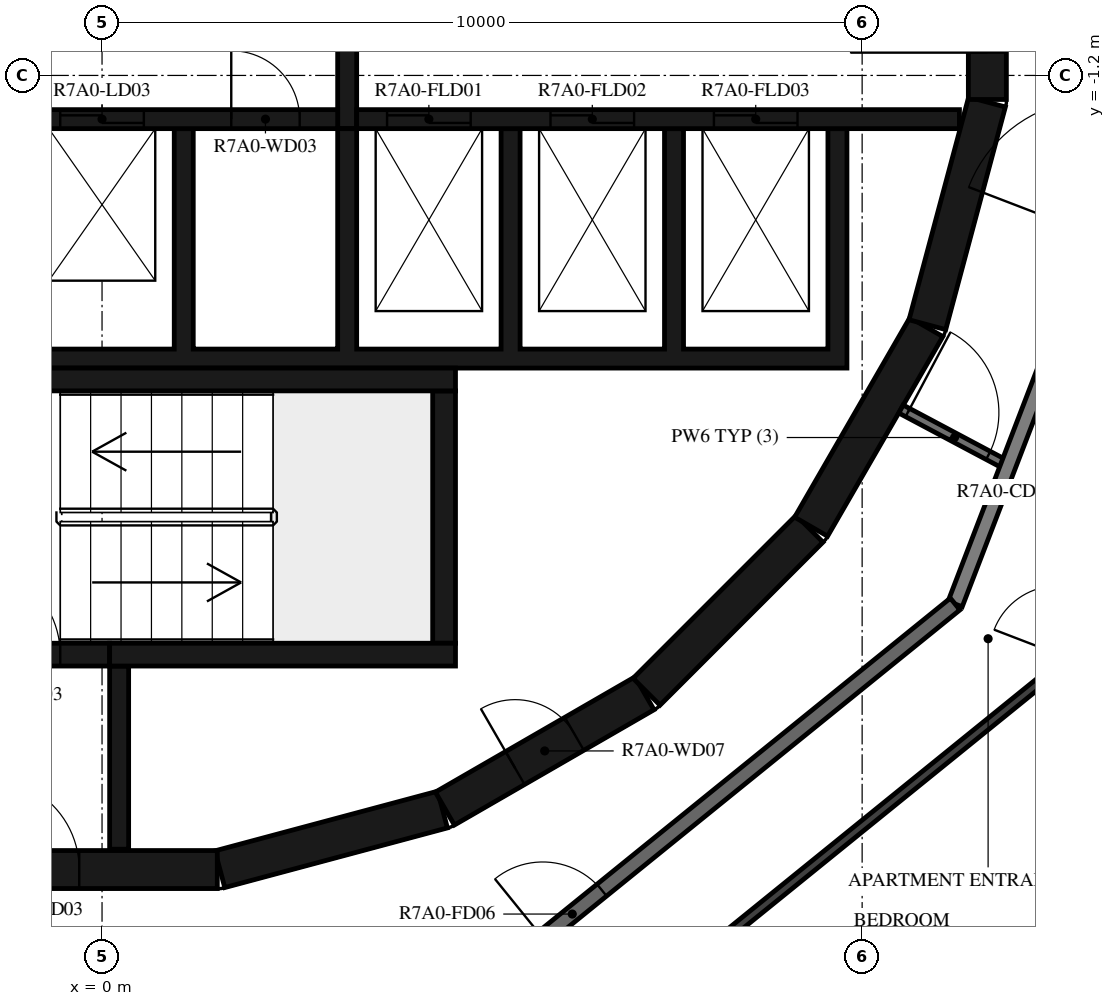
"""IFC4 building model, lengths in metres.
Left out: names, types, materials, properties, quantities, classifications, styles, units other than length and angle.
Written with IfcOpenShell. Run it as: python <this file> out.ifc"""

import sys

from ifc_helpers import new_model, si_unit, direction, frame, frame_2d, origin, place, context, subcontext, project, spatial, polyline, rectangle, outline, extrude, element, fill, save


model = new_model("IFC4")
c1 = context("Model", 3, precision=1e-05, world=origin(), true_north=direction((0.0, 1.0)))
c2 = subcontext(c1, "Body", "Model", "MODEL_VIEW")
j1 = project(units=[si_unit("LENGTHUNIT", "METRE"), si_unit("PLANEANGLEUNIT", "RADIAN")], contexts=[c1])
p1 = place(None, origin())
s1 = spatial("IfcSite", under=j1, at=p1, CompositionType="ELEMENT")
p2 = place(p1, origin())
s2 = spatial("IfcBuilding", under=s1, at=p2, CompositionType="ELEMENT")
p3 = place(p2, frame((0.0, 0.0, 270.4)))
s3 = spatial("IfcBuildingStorey", under=s2, at=p3, CompositionType="ELEMENT", Elevation=270.4)
p4 = place(p3, frame((1.55, -11.643, 0.0), z_axis=(0.0, 0.0, 1.0), x_axis=(0.965948410781, 0.258734743916, 0.0)))
e1 = element("IfcWall", 1, at=p4, inside=s3, PredefinedType="SHEAR", context=c2, shape_type="SweptSolid", body=[
    extrude(rectangle(XDim=3.033, YDim=0.5, at=frame_2d((1.516, 0.0))), origin(), (0.0, 0.0, 1.0), 3.12),
])
p5 = place(p3, frame((4.51, -10.845, 0.0), z_axis=(0.0, 0.0, 1.0), x_axis=(0.865975092491, 0.500087131594, 0.0)))
e2 = element("IfcWall", 2, at=p5, inside=s3, PredefinedType="SHEAR", context=c2, shape_type="SweptSolid", body=[
    extrude(rectangle(XDim=3.033, YDim=0.5, at=frame_2d((1.516, 0.0))), origin(), (0.0, 0.0, 1.0), 3.12),
])
p6 = place(p5, frame((1.066, 0.0, 0.0)))
e3 = element("IfcOpeningElement", 3, at=p6, cuts=e2, PredefinedType="OPENING", context=c2, shape_type="SweptSolid", body=[
    extrude(rectangle(XDim=0.9, YDim=2.1, at=frame_2d((0.45, 1.05))), frame((0.0, 0.26, 0.0), z_axis=(0.0, -1.0, 0.0), x_axis=(1.0, 0.0, 0.0)), (0.0, 0.0, 1.0), 0.52),
])
p7 = place(p3, frame((7.164, -9.308, 0.0), z_axis=(0.0, 0.0, 1.0), x_axis=(0.707106781187, 0.707106781187, 0.0)))
e4 = element("IfcWall", 4, at=p7, inside=s3, PredefinedType="SHEAR", context=c2, shape_type="SweptSolid", body=[
    extrude(rectangle(XDim=3.032, YDim=0.5, at=frame_2d((1.516, 0.0))), origin(), (0.0, 0.0, 1.0), 3.12),
])
for number, where, z_axis, x_axis in (
    (5, (9.329, -7.137, 0.0), (0.0, 0.0, 1.0), (0.5, 0.866, 0.0)),
    (6, (10.858, -4.479, 0.0), (0.0, 0.0, 1.0), (0.259, 0.966, 0.0)),
):
    element("IfcWall", number, at=place(p3, frame(where, z_axis=z_axis, x_axis=x_axis)), inside=s3, PredefinedType="SHEAR", context=c2, shape_type="SweptSolid", body=[
        extrude(rectangle(XDim=3.033, YDim=0.5, at=frame_2d((1.516, 0.0))), origin(), (0.0, 0.0, 1.0), 3.12),
    ])
p8 = place(p3, frame((11.647, -1.516, 0.0), z_axis=(0.0, 0.0, 1.0), x_axis=(0.0, 1.0, 0.0)))
e7 = element("IfcWall", 7, at=p8, inside=s3, PredefinedType="SHEAR", context=c2, shape_type="SweptSolid", body=[
    extrude(rectangle(XDim=3.033, YDim=0.5, at=frame_2d((1.516, 0.0))), origin(), (0.0, 0.0, 1.0), 3.12),
])
p9 = place(p8, frame((0.616, 0.0, 0.0)))
e8 = element("IfcOpeningElement", 8, at=p9, cuts=e7, PredefinedType="OPENING", context=c2, shape_type="SweptSolid", body=[
    extrude(rectangle(XDim=1.8, YDim=2.1, at=frame_2d((0.9, 1.05))), frame((0.0, 0.26, 0.0), z_axis=(0.0, -1.0, 0.0), x_axis=(1.0, 0.0, 0.0)), (0.0, 0.0, 1.0), 0.52),
])
p10 = place(p3, frame((-1.516, -11.647, 0.0), z_axis=(0.0, 0.0, 1.0), x_axis=(1.0, 0.0, 0.0)))
e9 = element("IfcWall", 9, at=p10, inside=s3, PredefinedType="SHEAR", context=c2, shape_type="SweptSolid", body=[
    extrude(rectangle(XDim=3.033, YDim=0.5, at=frame_2d((1.516, 0.0))), origin(), (0.0, 0.0, 1.0), 3.12),
])
p11 = place(p10, frame((0.016, 0.0, 0.0)))
e10 = element("IfcOpeningElement", 10, at=p11, cuts=e9, PredefinedType="OPENING", context=c2, shape_type="SweptSolid", body=[
    extrude(rectangle(XDim=1.2, YDim=2.1, at=frame_2d((0.6, 1.05))), frame((0.0, 0.26, 0.0), z_axis=(0.0, -1.0, 0.0), x_axis=(1.0, 0.0, 0.0)), (0.0, 0.0, 1.0), 0.52),
])
p12 = place(p3, frame((-2.4, -5.2, 0.0), z_axis=(0.0, 0.0, 1.0), x_axis=(1.0, 0.0, 0.0)))
e11 = element("IfcWall", 11, at=p12, inside=s3, PredefinedType="SHEAR", context=c2, shape_type="SweptSolid", body=[
    extrude(rectangle(XDim=7.05, YDim=0.3, at=frame_2d((3.525, 0.0))), origin(), (0.0, 0.0, 1.0), 3.12),
])
p13 = place(p3, frame((4.5, -8.67, 0.0), z_axis=(0.0, 0.0, 1.0), x_axis=(0.0, 1.0, 0.0)))
e12 = element("IfcWall", 12, at=p13, inside=s3, PredefinedType="SHEAR", context=c2, shape_type="SweptSolid", body=[
    extrude(rectangle(XDim=3.32, YDim=0.3, at=frame_2d((1.66, 0.0))), origin(), (0.0, 0.0, 1.0), 3.12),
])
p14 = place(p3, frame((0.1, -8.82, 0.0), z_axis=(0.0, 0.0, 1.0), x_axis=(1.0, 0.0, 0.0)))
e13 = element("IfcWall", 13, at=p14, inside=s3, PredefinedType="SHEAR", context=c2, shape_type="SweptSolid", body=[
    extrude(rectangle(XDim=4.55, YDim=0.3, at=frame_2d((2.275, 0.0))), origin(), (0.0, 0.0, 1.0), 3.12),
])
p15 = place(p3, frame((-2.4, -8.82, 0.0), z_axis=(0.0, 0.0, 1.0), x_axis=(1.0, 0.0, 0.0)))
e14 = element("IfcWall", 14, at=p15, inside=s3, PredefinedType="SHEAR", context=c2, shape_type="SweptSolid", body=[
    extrude(rectangle(XDim=2.5, YDim=0.3, at=frame_2d((1.25, 0.0))), origin(), (0.0, 0.0, 1.0), 3.12),
])
p16 = place(p15, frame((0.65, 0.0, 0.0)))
e15 = element("IfcOpeningElement", 15, at=p16, cuts=e14, PredefinedType="OPENING", context=c2, shape_type="SweptSolid", body=[
    extrude(rectangle(XDim=1.2, YDim=2.1, at=frame_2d((0.6, 1.05))), frame((0.0, 0.16, 0.0), z_axis=(0.0, -1.0, 0.0), x_axis=(1.0, 0.0, 0.0)), (0.0, 0.0, 1.0), 0.32),
])
p17 = place(p3, frame((0.225, -8.97, 0.0), z_axis=(0.0, 0.0, 1.0), x_axis=(0.0, -1.0, 0.0)))
e16 = element("IfcWall", 16, at=p17, inside=s3, PredefinedType="SHEAR", context=c2, shape_type="SweptSolid", body=[
    extrude(rectangle(XDim=2.41, YDim=0.25, at=frame_2d((1.205, 0.0))), origin(), (0.0, 0.0, 1.0), 3.12),
])
p18 = place(p3, origin())
e17 = element("IfcWall", 17, at=p18, inside=s3, PredefinedType="SHEAR", context=c2, shape_type="SweptSolid", body=[
    extrude(outline(polyline([(9.8, -5.05), (9.8, -4.8), (9.8, -1.9), (9.55, -1.9), (9.55, -4.8), (7.65, -4.8), (7.65, -1.9), (7.4, -1.9), (7.4, -4.8), (5.5, -4.8), (5.5, -1.9), (5.25, -1.9), (5.25, -4.8), (3.35, -4.8), (3.35, -1.9), (3.1, -1.9), (3.1, -4.8), (1.2, -4.8), (1.2, -1.9), (0.95, -1.9), (0.95, -4.8), (-0.95, -4.8), (-0.95, -1.9), (-1.2, -1.9), (-1.2, -4.8), (-3.1, -4.8), (-3.1, -1.9), (-3.35, -1.9), (-3.35, -4.8), (-5.25, -4.8), (-5.25, -1.9), (-5.5, -1.9), (-5.5, -4.8), (-7.4, -4.8), (-7.4, -1.9), (-7.65, -1.9), (-7.65, -4.8), (-9.55, -4.8), (-9.55, -1.9), (-9.8, -1.9), (-9.8, -4.8), (-9.8, -5.05), (9.8, -5.05)])), origin(), (0.0, 0.0, 1.0), 3.12),
])
p19 = place(p3, frame((-11.28, -1.775, 0.0), z_axis=(0.0, 0.0, 1.0), x_axis=(1.0, 0.0, 0.0)))
e18 = element("IfcWall", 18, at=p19, inside=s3, PredefinedType="SHEAR", context=c2, shape_type="SweptSolid", body=[
    extrude(rectangle(XDim=14.38, YDim=0.25, at=frame_2d((7.19, 0.0))), origin(), (0.0, 0.0, 1.0), 3.12),
])
p20 = place(p19, frame((2.03, 0.0, 0.0)))
e19 = element("IfcOpeningElement", 19, at=p20, cuts=e18, PredefinedType="OPENING", context=c2, shape_type="SweptSolid", body=[
    extrude(rectangle(XDim=1.3, YDim=2.1, at=frame_2d((0.65, 1.05))), frame((0.0, 0.135, 0.0), z_axis=(0.0, -1.0, 0.0), x_axis=(1.0, 0.0, 0.0)), (0.0, 0.0, 1.0), 0.27),
])
p21 = place(p19, frame((4.18, 0.0, 0.0)))
e20 = element("IfcOpeningElement", 20, at=p21, cuts=e18, PredefinedType="OPENING", context=c2, shape_type="SweptSolid", body=[
    extrude(rectangle(XDim=1.3, YDim=2.1, at=frame_2d((0.65, 1.05))), frame((0.0, 0.135, 0.0), z_axis=(0.0, -1.0, 0.0), x_axis=(1.0, 0.0, 0.0)), (0.0, 0.0, 1.0), 0.27),
])
p22 = place(p19, frame((6.43, 0.0, 0.0)))
e21 = element("IfcOpeningElement", 21, at=p22, cuts=e18, PredefinedType="OPENING", context=c2, shape_type="SweptSolid", body=[
    extrude(rectangle(XDim=1.1, YDim=2.1, at=frame_2d((0.55, 1.05))), frame((0.0, 0.135, 0.0), z_axis=(0.0, -1.0, 0.0), x_axis=(1.0, 0.0, 0.0)), (0.0, 0.0, 1.0), 0.27),
])
p23 = place(p19, frame((8.58, 0.0, 0.0)))
e22 = element("IfcOpeningElement", 22, at=p23, cuts=e18, PredefinedType="OPENING", context=c2, shape_type="SweptSolid", body=[
    extrude(rectangle(XDim=1.1, YDim=2.1, at=frame_2d((0.55, 1.05))), frame((0.0, 0.135, 0.0), z_axis=(0.0, -1.0, 0.0), x_axis=(1.0, 0.0, 0.0)), (0.0, 0.0, 1.0), 0.27),
])
p24 = place(p19, frame((10.73, 0.0, 0.0)))
e23 = element("IfcOpeningElement", 23, at=p24, cuts=e18, PredefinedType="OPENING", context=c2, shape_type="SweptSolid", body=[
    extrude(rectangle(XDim=1.1, YDim=2.1, at=frame_2d((0.55, 1.05))), frame((0.0, 0.135, 0.0), z_axis=(0.0, -1.0, 0.0), x_axis=(1.0, 0.0, 0.0)), (0.0, 0.0, 1.0), 0.27),
])
p25 = place(p19, frame((12.98, 0.0, 0.0)))
e24 = element("IfcOpeningElement", 24, at=p25, cuts=e18, PredefinedType="OPENING", context=c2, shape_type="SweptSolid", body=[
    extrude(rectangle(XDim=0.9, YDim=2.1, at=frame_2d((0.45, 1.05))), frame((0.0, 0.135, 0.0), z_axis=(0.0, -1.0, 0.0), x_axis=(1.0, 0.0, 0.0)), (0.0, 0.0, 1.0), 0.27),
])
p26 = place(p3, frame((3.35, -1.775, 0.0), z_axis=(0.0, 0.0, 1.0), x_axis=(1.0, 0.0, 0.0)))
e25 = element("IfcWall", 25, at=p26, inside=s3, PredefinedType="SHEAR", context=c2, shape_type="SweptSolid", body=[
    extrude(rectangle(XDim=7.93, YDim=0.25, at=frame_2d((3.965, 0.0))), origin(), (0.0, 0.0, 1.0), 3.12),
])
p27 = place(p26, frame((0.4, 0.0, 0.0)))
e26 = element("IfcOpeningElement", 26, at=p27, cuts=e25, PredefinedType="OPENING", context=c2, shape_type="SweptSolid", body=[
    extrude(rectangle(XDim=1.1, YDim=2.4, at=frame_2d((0.55, 1.2))), frame((0.0, 0.135, 0.0), z_axis=(0.0, -1.0, 0.0), x_axis=(1.0, 0.0, 0.0)), (0.0, 0.0, 1.0), 0.27),
])
p28 = place(p26, frame((2.55, 0.0, 0.0)))
e27 = element("IfcOpeningElement", 27, at=p28, cuts=e25, PredefinedType="OPENING", context=c2, shape_type="SweptSolid", body=[
    extrude(rectangle(XDim=1.1, YDim=2.4, at=frame_2d((0.55, 1.2))), frame((0.0, 0.135, 0.0), z_axis=(0.0, -1.0, 0.0), x_axis=(1.0, 0.0, 0.0)), (0.0, 0.0, 1.0), 0.27),
])
p29 = place(p26, frame((4.7, 0.0, 0.0)))
e28 = element("IfcOpeningElement", 28, at=p29, cuts=e25, PredefinedType="OPENING", context=c2, shape_type="SweptSolid", body=[
    extrude(rectangle(XDim=1.1, YDim=2.4, at=frame_2d((0.55, 1.2))), frame((0.0, 0.135, 0.0), z_axis=(0.0, -1.0, 0.0), x_axis=(1.0, 0.0, 0.0)), (0.0, 0.0, 1.0), 0.27),
])
p30 = place(p3, frame((3.225, -1.9, 0.0), z_axis=(0.0, 0.0, 1.0), x_axis=(0.0, 1.0, 0.0)))
e29 = element("IfcWall", 29, at=p30, inside=s3, PredefinedType="SHEAR", context=c2, shape_type="SweptSolid", body=[
    extrude(rectangle(XDim=3.8, YDim=0.25, at=frame_2d((1.9, 0.0))), origin(), (0.0, 0.0, 1.0), 3.12),
])
p31 = place(p3, frame((10.511, -5.589, 0.0), z_axis=(0.0, 0.0, 1.0), x_axis=(0.882983002821, -0.469404960273, 0.0)))
e30 = element("IfcWall", 30, at=p31, inside=s3, PredefinedType="PARTITIONING", context=c2, shape_type="SweptSolid", body=[
    extrude(rectangle(XDim=1.596, YDim=0.12, at=frame_2d((0.798, 0.0))), origin(), (0.0, 0.0, 1.0), 3.12),
])
p32 = place(p31, frame((0.1, 0.0, 0.0)))
e31 = element("IfcOpeningElement", 31, at=p32, cuts=e30, PredefinedType="OPENING", context=c2, shape_type="SweptSolid", body=[
    extrude(rectangle(XDim=1.2, YDim=2.1, at=frame_2d((0.6, 1.05))), frame((0.0, 0.07, 0.0), z_axis=(0.0, -1.0, 0.0), x_axis=(1.0, 0.0, 0.0)), (0.0, 0.0, 1.0), 0.14),
])
p33 = place(p3, frame((11.223, -8.154, 0.0), z_axis=(0.0, 0.0, 1.0), x_axis=(0.358341090983, 0.93359073609, 0.0)))
e32 = element("IfcWall", 32, at=p33, inside=s3, PredefinedType="STANDARD", context=c2, shape_type="SweptSolid", body=[
    extrude(rectangle(XDim=7.181, YDim=0.2, at=frame_2d((3.59, 0.0))), origin(), (0.0, 0.0, 1.0), 3.12),
])
p34 = place(p33, frame((5.185, 0.0, 0.0)))
e33 = element("IfcOpeningElement", 33, at=p34, cuts=e32, PredefinedType="OPENING", context=c2, shape_type="SweptSolid", body=[
    extrude(rectangle(XDim=1.8, YDim=2.1, at=frame_2d((0.9, 1.05))), frame((0.0, 0.11, 0.0), z_axis=(0.0, -1.0, 0.0), x_axis=(1.0, 0.0, 0.0)), (0.0, 0.0, 1.0), 0.22),
])
p35 = place(p3, frame((5.643, -12.673, 0.0), z_axis=(0.0, 0.0, 1.0), x_axis=(0.777160148113, 0.629302871585, 0.0)))
e34 = element("IfcWall", 34, at=p35, inside=s3, PredefinedType="STANDARD", context=c2, shape_type="SweptSolid", body=[
    extrude(rectangle(XDim=7.181, YDim=0.2, at=frame_2d((3.59, 0.0))), origin(), (0.0, 0.0, 1.0), 3.12),
])
p36 = place(p35, frame((0.2, 0.0, 0.0)))
e35 = element("IfcOpeningElement", 35, at=p36, cuts=e34, PredefinedType="OPENING", context=c2, shape_type="SweptSolid", body=[
    extrude(rectangle(XDim=1.0, YDim=2.1, at=frame_2d((0.5, 1.05))), frame((0.0, 0.11, 0.0), z_axis=(0.0, -1.0, 0.0), x_axis=(1.0, 0.0, 0.0)), (0.0, 0.0, 1.0), 0.22),
])
p37 = place(p3, frame((6.274, -14.092, 0.0), z_axis=(0.0, 0.0, 1.0), x_axis=(0.777135206268, 0.62933367237, 0.0)))
e36 = element("IfcWall", 36, at=p37, inside=s3, PredefinedType="PARTITIONING", context=c2, shape_type="SweptSolid", body=[
    extrude(rectangle(XDim=7.985, YDim=0.12, at=frame_2d((3.992, 0.0))), origin(), (0.0, 0.0, 1.0), 3.12),
])
p38 = place(p37, frame((0.2, 0.0, 0.0)))
e37 = element("IfcOpeningElement", 37, at=p38, cuts=e36, PredefinedType="OPENING", context=c2, shape_type="SweptSolid", body=[
    extrude(rectangle(XDim=0.9, YDim=2.1, at=frame_2d((0.45, 1.05))), frame((0.0, 0.07, 0.0), z_axis=(0.0, -1.0, 0.0), x_axis=(1.0, 0.0, 0.0)), (0.0, 0.0, 1.0), 0.14),
])
p39 = place(p16, origin())
e38 = element("IfcDoor", 38, at=p39, inside=s3, OperationType="SINGLE_SWING_LEFT", PredefinedType="DOOR", context=c2, shape_type="SweptSolid", body=[
    extrude(rectangle(XDim=1.2, YDim=2.1, at=frame_2d((0.6, 1.05))), frame((0.0, 0.025, 0.0), z_axis=(0.0, -1.0, 0.0), x_axis=(1.0, 0.0, 0.0)), (0.0, 0.0, 1.0), 0.05),
])
fill(e15, e38)
p40 = place(p11, origin())
e39 = element("IfcDoor", 39, at=p40, inside=s3, OperationType="SINGLE_SWING_RIGHT", PredefinedType="DOOR", context=c2, shape_type="SweptSolid", body=[
    extrude(rectangle(XDim=1.2, YDim=2.1, at=frame_2d((0.6, 1.05))), frame((0.0, 0.025, 0.0), z_axis=(0.0, -1.0, 0.0), x_axis=(1.0, 0.0, 0.0)), (0.0, 0.0, 1.0), 0.05),
])
fill(e10, e39)
p41 = place(p9, origin())
e40 = element("IfcDoor", 40, at=p41, inside=s3, OperationType="DOUBLE_DOOR_SINGLE_SWING", PredefinedType="DOOR", context=c2, shape_type="SweptSolid", body=[
    extrude(rectangle(XDim=1.8, YDim=2.1, at=frame_2d((0.9, 1.05))), frame((0.0, 0.025, 0.0), z_axis=(0.0, -1.0, 0.0), x_axis=(1.0, 0.0, 0.0)), (0.0, 0.0, 1.0), 0.05),
])
fill(e8, e40)
p42 = place(p24, origin())
e41 = element("IfcDoor", 41, at=p42, inside=s3, OperationType="DOUBLE_DOOR_SLIDING", PredefinedType="DOOR", context=c2, shape_type="SweptSolid", body=[
    extrude(rectangle(XDim=1.1, YDim=2.1, at=frame_2d((0.55, 1.05))), frame((0.0, 0.025, 0.0), z_axis=(0.0, -1.0, 0.0), x_axis=(1.0, 0.0, 0.0)), (0.0, 0.0, 1.0), 0.05),
])
fill(e23, e41)
p43 = place(p27, origin())
e42 = element("IfcDoor", 42, at=p43, inside=s3, OperationType="DOUBLE_DOOR_SLIDING", PredefinedType="DOOR", context=c2, shape_type="SweptSolid", body=[
    extrude(rectangle(XDim=1.1, YDim=2.4, at=frame_2d((0.55, 1.2))), frame((0.0, 0.025, 0.0), z_axis=(0.0, -1.0, 0.0), x_axis=(1.0, 0.0, 0.0)), (0.0, 0.0, 1.0), 0.05),
])
fill(e26, e42)
p44 = place(p28, origin())
e43 = element("IfcDoor", 43, at=p44, inside=s3, OperationType="DOUBLE_DOOR_SLIDING", PredefinedType="DOOR", context=c2, shape_type="SweptSolid", body=[
    extrude(rectangle(XDim=1.1, YDim=2.4, at=frame_2d((0.55, 1.2))), frame((0.0, 0.025, 0.0), z_axis=(0.0, -1.0, 0.0), x_axis=(1.0, 0.0, 0.0)), (0.0, 0.0, 1.0), 0.05),
])
fill(e27, e43)
p45 = place(p29, origin())
e44 = element("IfcDoor", 44, at=p45, inside=s3, OperationType="DOUBLE_DOOR_SLIDING", PredefinedType="DOOR", context=c2, shape_type="SweptSolid", body=[
    extrude(rectangle(XDim=1.1, YDim=2.4, at=frame_2d((0.55, 1.2))), frame((0.0, 0.025, 0.0), z_axis=(0.0, -1.0, 0.0), x_axis=(1.0, 0.0, 0.0)), (0.0, 0.0, 1.0), 0.05),
])
fill(e28, e44)
p46 = place(p25, origin())
e45 = element("IfcDoor", 45, at=p46, inside=s3, OperationType="SINGLE_SWING_LEFT", PredefinedType="DOOR", context=c2, shape_type="SweptSolid", body=[
    extrude(rectangle(XDim=0.9, YDim=2.1, at=frame_2d((0.45, 1.05))), frame((0.0, 0.025, 0.0), z_axis=(0.0, -1.0, 0.0), x_axis=(1.0, 0.0, 0.0)), (0.0, 0.0, 1.0), 0.05),
])
fill(e24, e45)
p47 = place(p6, origin())
e46 = element("IfcDoor", 46, at=p47, inside=s3, OperationType="SINGLE_SWING_LEFT", PredefinedType="DOOR", context=c2, shape_type="SweptSolid", body=[
    extrude(rectangle(XDim=0.9, YDim=2.1, at=frame_2d((0.45, 1.05))), frame((0.0, 0.025, 0.0), z_axis=(0.0, -1.0, 0.0), x_axis=(1.0, 0.0, 0.0)), (0.0, 0.0, 1.0), 0.05),
])
fill(e3, e46)
p48 = place(p36, origin())
e47 = element("IfcDoor", 47, at=p48, inside=s3, OperationType="SINGLE_SWING_LEFT", PredefinedType="DOOR", context=c2, shape_type="SweptSolid", body=[
    extrude(rectangle(XDim=1.0, YDim=2.1, at=frame_2d((0.5, 1.05))), frame((0.0, 0.025, 0.0), z_axis=(0.0, -1.0, 0.0), x_axis=(1.0, 0.0, 0.0)), (0.0, 0.0, 1.0), 0.05),
])
fill(e35, e47)
p49 = place(p32, origin())
e48 = element("IfcDoor", 48, at=p49, inside=s3, OperationType="DOUBLE_DOOR_SINGLE_SWING", PredefinedType="DOOR", context=c2, shape_type="SweptSolid", body=[
    extrude(rectangle(XDim=1.2, YDim=2.1, at=frame_2d((0.6, 1.05))), frame((0.0, 0.025, 0.0), z_axis=(0.0, -1.0, 0.0), x_axis=(1.0, 0.0, 0.0)), (0.0, 0.0, 1.0), 0.05),
])
fill(e31, e48)
save(model, sys.argv[1])
